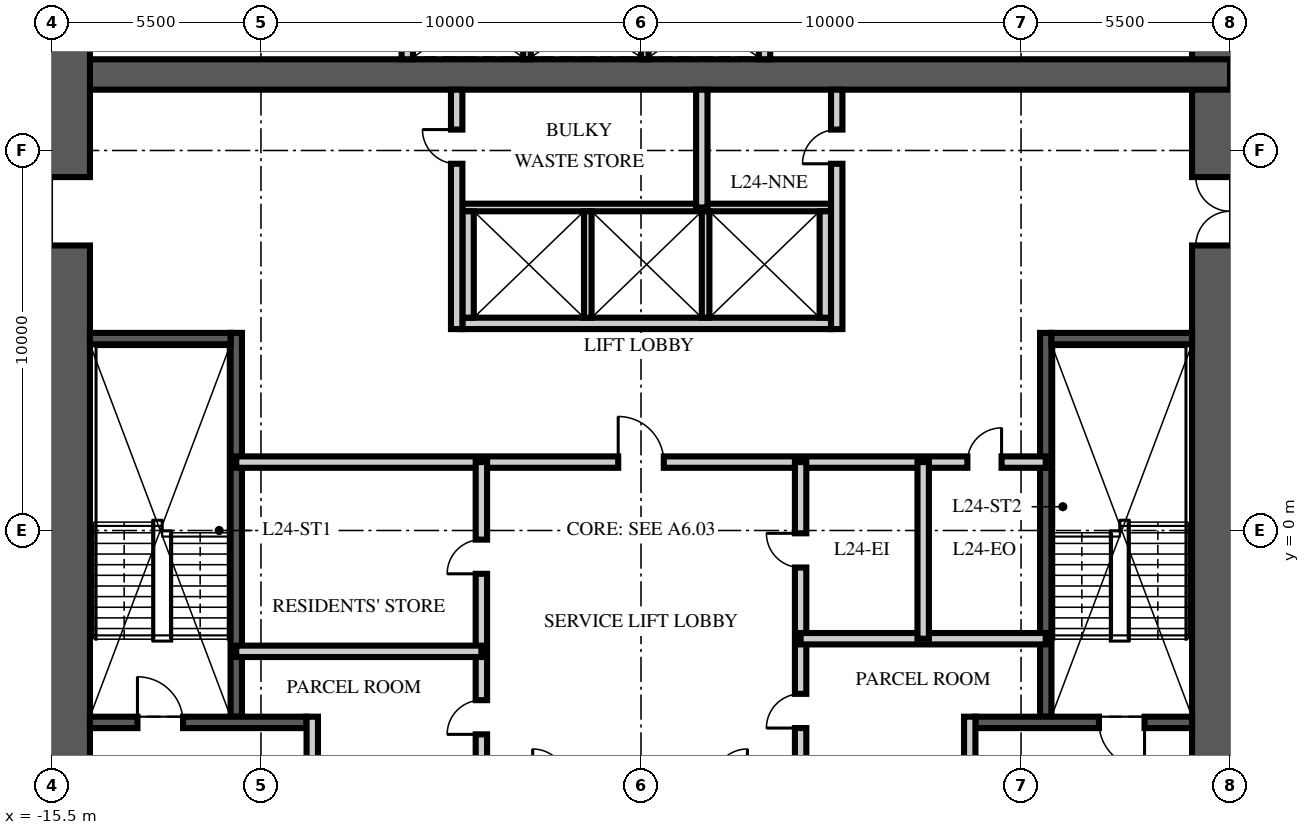
"""IFC4 building model, lengths in metres.
Left out: names, types, materials, properties, quantities, classifications, styles, units other than length and angle.
Written with IfcOpenShell. Run it as: python <this file> out.ifc"""

import sys

from ifc_helpers import new_model, si_unit, direction, frame, frame_2d, origin, place, context, subcontext, project, spatial, rectangle, extrude, element, fill, save


model = new_model("IFC4")
c1 = context("Model", 3, precision=1e-05, world=origin(), true_north=direction((0.0, 1.0)))
c2 = subcontext(c1, "Body", "Model", "MODEL_VIEW")
j1 = project(units=[si_unit("LENGTHUNIT", "METRE"), si_unit("PLANEANGLEUNIT", "RADIAN")], contexts=[c1])
p1 = place(None, origin())
s1 = spatial("IfcSite", under=j1, at=p1, CompositionType="ELEMENT")
p2 = place(p1, origin())
s2 = spatial("IfcBuilding", under=s1, at=p2, CompositionType="ELEMENT")
p3 = place(p2, frame((0.0, 0.0, 96.0)))
s3 = spatial("IfcBuildingStorey", under=s2, at=p3, CompositionType="ELEMENT", Elevation=96.0)
p4 = place(p3, frame((15.5, -15.5, -0.25), z_axis=(0.0, 0.0, 1.0), x_axis=(0.0, 1.0, 0.0)))
e1 = element("IfcWall", 1, at=p4, inside=s3, PredefinedType="SHEAR", context=c2, shape_type="SweptSolid", body=[
    extrude(rectangle(XDim=31.0, YDim=2.0, at=frame_2d((15.5, 0.0))), origin(), (0.0, 0.0, 1.0), 3.65),
])
p5 = place(p4, frame((6.5, 0.0, 0.25)))
e2 = element("IfcOpeningElement", 2, at=p5, cuts=e1, PredefinedType="OPENING", context=c2, shape_type="SweptSolid", body=[
    extrude(rectangle(XDim=1.2, YDim=2.1, at=frame_2d((0.6, 1.05))), frame((0.0, 1.01, 0.0), z_axis=(0.0, -1.0, 0.0), x_axis=(1.0, 0.0, 0.0)), (0.0, 0.0, 1.0), 2.02),
])
p6 = place(p4, frame((23.0, 0.0, 0.25)))
e3 = element("IfcOpeningElement", 3, at=p6, cuts=e1, PredefinedType="OPENING", context=c2, shape_type="SweptSolid", body=[
    extrude(rectangle(XDim=1.8, YDim=2.1, at=frame_2d((0.9, 1.05))), frame((0.0, 1.01, 0.0), z_axis=(0.0, -1.0, 0.0), x_axis=(1.0, 0.0, 0.0)), (0.0, 0.0, 1.0), 2.02),
])
p7 = place(p3, frame((-15.5, 12.0, -0.25), z_axis=(0.0, 0.0, 1.0), x_axis=(1.0, 0.0, 0.0)))
e4 = element("IfcWall", 4, at=p7, inside=s3, PredefinedType="SHEAR", context=c2, shape_type="SweptSolid", body=[
    extrude(rectangle(XDim=31.0, YDim=0.8, at=frame_2d((15.5, 0.0))), origin(), (0.0, 0.0, 1.0), 3.65),
])
p8 = place(p3, frame((-15.5, -15.5, -0.25), z_axis=(0.0, 0.0, 1.0), x_axis=(0.0, 1.0, 0.0)))
e5 = element("IfcWall", 5, at=p8, inside=s3, PredefinedType="SHEAR", context=c2, shape_type="SweptSolid", body=[
    extrude(rectangle(XDim=31.0, YDim=2.0, at=frame_2d((15.5, 0.0))), origin(), (0.0, 0.0, 1.0), 3.65),
])
p9 = place(p8, frame((6.5, 0.0, 0.25)))
e6 = element("IfcOpeningElement", 6, at=p9, cuts=e5, PredefinedType="OPENING", context=c2, shape_type="SweptSolid", body=[
    extrude(rectangle(XDim=1.2, YDim=2.1, at=frame_2d((0.6, 1.05))), frame((0.0, 1.01, 0.0), z_axis=(0.0, -1.0, 0.0), x_axis=(1.0, 0.0, 0.0)), (0.0, 0.0, 1.0), 2.02),
])
p10 = place(p8, frame((23.0, 0.0, 0.25)))
e7 = element("IfcOpeningElement", 7, at=p10, cuts=e5, PredefinedType="OPENING", context=c2, shape_type="SweptSolid", body=[
    extrude(rectangle(XDim=1.8, YDim=2.1, at=frame_2d((0.9, 1.05))), frame((0.0, 1.01, 0.0), z_axis=(0.0, -1.0, 0.0), x_axis=(1.0, 0.0, 0.0)), (0.0, 0.0, 1.0), 2.02),
])
p11 = place(p3, frame((-10.65, -4.9, 0.0), z_axis=(0.0, 0.0, 1.0), x_axis=(0.0, 1.0, 0.0)))
e8 = element("IfcWall", 8, at=p11, inside=s3, PredefinedType="SOLIDWALL", context=c2, shape_type="SweptSolid", body=[
    extrude(rectangle(XDim=10.1, YDim=0.3, at=frame_2d((5.05, 0.0))), origin(), (0.0, 0.0, 1.0), 3.4),
])
p12 = place(p3, frame((-14.5, -5.05, 0.0), z_axis=(0.0, 0.0, 1.0), x_axis=(1.0, 0.0, 0.0)))
e9 = element("IfcWall", 9, at=p12, inside=s3, PredefinedType="SOLIDWALL", context=c2, shape_type="SweptSolid", body=[
    extrude(rectangle(XDim=5.7, YDim=0.3, at=frame_2d((2.85, 0.0))), origin(), (0.0, 0.0, 1.0), 3.4),
])
p13 = place(p12, frame((1.25, 0.0, 0.0)))
e10 = element("IfcOpeningElement", 10, at=p13, cuts=e9, PredefinedType="OPENING", context=c2, shape_type="SweptSolid", body=[
    extrude(rectangle(XDim=1.2, YDim=2.1, at=frame_2d((0.6, 1.05))), frame((0.0, 0.16, 0.0), z_axis=(0.0, -1.0, 0.0), x_axis=(1.0, 0.0, 0.0)), (0.0, 0.0, 1.0), 0.32),
])
p14 = place(p3, frame((-14.5, 5.05, 0.0), z_axis=(0.0, 0.0, 1.0), x_axis=(1.0, 0.0, 0.0)))
e11 = element("IfcWall", 11, at=p14, inside=s3, PredefinedType="SOLIDWALL", context=c2, shape_type="SweptSolid", body=[
    extrude(rectangle(XDim=3.7, YDim=0.3, at=frame_2d((1.85, 0.0))), origin(), (0.0, 0.0, 1.0), 3.4),
])
p15 = place(p3, frame((-8.65, -11.6, 0.0), z_axis=(0.0, 0.0, 1.0), x_axis=(0.0, 1.0, 0.0)))
e12 = element("IfcWall", 12, at=p15, inside=s3, PredefinedType="PARTITIONING", context=c2, shape_type="SweptSolid", body=[
    extrude(rectangle(XDim=6.7, YDim=0.3, at=frame_2d((3.35, 0.0))), origin(), (0.0, 0.0, 1.0), 3.4),
])
p16 = place(p15, frame((2.85, 0.0, 0.0)))
e13 = element("IfcOpeningElement", 13, at=p16, cuts=e12, PredefinedType="OPENING", context=c2, shape_type="SweptSolid", body=[
    extrude(rectangle(XDim=1.1, YDim=2.1, at=frame_2d((0.55, 1.05))), frame((0.0, 0.16, 0.0), z_axis=(0.0, -1.0, 0.0), x_axis=(1.0, 0.0, 0.0)), (0.0, 0.0, 1.0), 0.32),
])
p17 = place(p3, frame((10.65, -4.9, 0.0), z_axis=(0.0, 0.0, 1.0), x_axis=(0.0, 1.0, 0.0)))
e14 = element("IfcWall", 14, at=p17, inside=s3, PredefinedType="SOLIDWALL", context=c2, shape_type="SweptSolid", body=[
    extrude(rectangle(XDim=10.1, YDim=0.3, at=frame_2d((5.05, 0.0))), origin(), (0.0, 0.0, 1.0), 3.4),
])
p18 = place(p3, frame((14.5, -5.05, 0.0), z_axis=(0.0, 0.0, 1.0), x_axis=(-1.0, 0.0, 0.0)))
e15 = element("IfcWall", 15, at=p18, inside=s3, PredefinedType="SOLIDWALL", context=c2, shape_type="SweptSolid", body=[
    extrude(rectangle(XDim=5.7, YDim=0.3, at=frame_2d((2.85, 0.0))), origin(), (0.0, 0.0, 1.0), 3.4),
])
p19 = place(p18, frame((1.25, 0.0, 0.0)))
e16 = element("IfcOpeningElement", 16, at=p19, cuts=e15, PredefinedType="OPENING", context=c2, shape_type="SweptSolid", body=[
    extrude(rectangle(XDim=1.2, YDim=2.1, at=frame_2d((0.6, 1.05))), frame((0.0, 0.16, 0.0), z_axis=(0.0, -1.0, 0.0), x_axis=(1.0, 0.0, 0.0)), (0.0, 0.0, 1.0), 0.32),
])
p20 = place(p3, frame((14.5, 5.05, 0.0), z_axis=(0.0, 0.0, 1.0), x_axis=(-1.0, 0.0, 0.0)))
e17 = element("IfcWall", 17, at=p20, inside=s3, PredefinedType="SOLIDWALL", context=c2, shape_type="SweptSolid", body=[
    extrude(rectangle(XDim=3.7, YDim=0.3, at=frame_2d((1.85, 0.0))), origin(), (0.0, 0.0, 1.0), 3.4),
])
p21 = place(p3, frame((8.65, -11.6, 0.0), z_axis=(0.0, 0.0, 1.0), x_axis=(0.0, 1.0, 0.0)))
e18 = element("IfcWall", 18, at=p21, inside=s3, PredefinedType="PARTITIONING", context=c2, shape_type="SweptSolid", body=[
    extrude(rectangle(XDim=6.7, YDim=0.3, at=frame_2d((3.35, 0.0))), origin(), (0.0, 0.0, 1.0), 3.4),
])
p22 = place(p21, frame((2.85, 0.0, 0.0)))
e19 = element("IfcOpeningElement", 19, at=p22, cuts=e18, PredefinedType="OPENING", context=c2, shape_type="SweptSolid", body=[
    extrude(rectangle(XDim=1.1, YDim=2.1, at=frame_2d((0.55, 1.05))), frame((0.0, 0.16, 0.0), z_axis=(0.0, -1.0, 0.0), x_axis=(1.0, 0.0, 0.0)), (0.0, 0.0, 1.0), 0.32),
])
p23 = place(p3, frame((-4.7, 5.45, 0.0), z_axis=(0.0, 0.0, 1.0), x_axis=(1.0, 0.0, 0.0)))
e20 = element("IfcWall", 20, at=p23, inside=s3, PredefinedType="PARTITIONING", context=c2, shape_type="SweptSolid", body=[
    extrude(rectangle(XDim=9.7, YDim=0.3, at=frame_2d((4.85, 0.0))), origin(), (0.0, 0.0, 1.0), 3.4),
])
p24 = place(p3, frame((-4.7, 8.5, 0.0), z_axis=(0.0, 0.0, 1.0), x_axis=(1.0, 0.0, 0.0)))
e21 = element("IfcWall", 21, at=p24, inside=s3, PredefinedType="PARTITIONING", context=c2, shape_type="SweptSolid", body=[
    extrude(rectangle(XDim=9.7, YDim=0.2, at=frame_2d((4.85, 0.0))), origin(), (0.0, 0.0, 1.0), 3.4),
])
for number, where, z_axis, x_axis in (
    (22, (-4.55, 5.6, 0.0), (0.0, 0.0, 1.0), (0.0, 1.0, 0.0)),
    (23, (4.85, 5.6, 0.0), (0.0, 0.0, 1.0), (0.0, 1.0, 0.0)),
):
    element("IfcWall", number, at=place(p3, frame(where, z_axis=z_axis, x_axis=x_axis)), inside=s3, PredefinedType="PARTITIONING", context=c2, shape_type="SweptSolid", body=[
        extrude(rectangle(XDim=2.8, YDim=0.3, at=frame_2d((1.4, 0.0))), origin(), (0.0, 0.0, 1.0), 3.4),
    ])
for number, where, z_axis, x_axis in (
    (24, (-1.4, 5.6, 0.0), (0.0, 0.0, 1.0), (0.0, 1.0, 0.0)),
    (25, (1.7, 5.6, 0.0), (0.0, 0.0, 1.0), (0.0, 1.0, 0.0)),
):
    element("IfcWall", number, at=place(p3, frame(where, z_axis=z_axis, x_axis=x_axis)), inside=s3, PredefinedType="PARTITIONING", context=c2, shape_type="SweptSolid", body=[
        extrude(rectangle(XDim=2.8, YDim=0.2, at=frame_2d((1.4, 0.0))), origin(), (0.0, 0.0, 1.0), 3.4),
    ])
for number, where, z_axis, x_axis in (
    (26, (-6.15, 12.4, 0.0), (0.0, 0.0, 1.0), (0.0, 1.0, 0.0)),
    (27, (3.25, 12.4, 0.0), (0.0, 0.0, 1.0), (0.0, 1.0, 0.0)),
):
    element("IfcWall", number, at=place(p3, frame(where, z_axis=z_axis, x_axis=x_axis)), inside=s3, PredefinedType="PARTITIONING", context=c2, shape_type="SweptSolid", body=[
        extrude(rectangle(XDim=2.1, YDim=0.3, at=frame_2d((1.05, 0.0))), origin(), (0.0, 0.0, 1.0), 3.4),
    ])
for number, where, z_axis, x_axis in (
    (28, (-3.0, 12.4, 0.0), (0.0, 0.0, 1.0), (0.0, 1.0, 0.0)),
    (29, (0.1, 12.4, 0.0), (0.0, 0.0, 1.0), (0.0, 1.0, 0.0)),
):
    element("IfcWall", number, at=place(p3, frame(where, z_axis=z_axis, x_axis=x_axis)), inside=s3, PredefinedType="PARTITIONING", context=c2, shape_type="SweptSolid", body=[
        extrude(rectangle(XDim=2.1, YDim=0.2, at=frame_2d((1.05, 0.0))), origin(), (0.0, 0.0, 1.0), 3.4),
    ])
p25 = place(p3, frame((-10.65, 1.8, 0.0), z_axis=(0.0, 0.0, 1.0), x_axis=(1.0, 0.0, 0.0)))
e30 = element("IfcWall", 30, at=p25, inside=s3, PredefinedType="PARTITIONING", context=c2, shape_type="SweptSolid", body=[
    extrude(rectangle(XDim=21.3, YDim=0.3, at=frame_2d((10.65, 0.0))), origin(), (0.0, 0.0, 1.0), 3.4),
])
p26 = place(p25, frame((10.05, 0.0, 0.0)))
e31 = element("IfcOpeningElement", 31, at=p26, cuts=e30, PredefinedType="OPENING", context=c2, shape_type="SweptSolid", body=[
    extrude(rectangle(XDim=1.2, YDim=2.1, at=frame_2d((0.6, 1.05))), frame((0.0, 0.16, 0.0), z_axis=(0.0, -1.0, 0.0), x_axis=(1.0, 0.0, 0.0)), (0.0, 0.0, 1.0), 0.32),
])
p27 = place(p25, frame((19.238, 0.0, 0.0)))
e32 = element("IfcOpeningElement", 32, at=p27, cuts=e30, PredefinedType="OPENING", context=c2, shape_type="SweptSolid", body=[
    extrude(rectangle(XDim=0.9, YDim=2.1, at=frame_2d((0.45, 1.05))), frame((0.0, 0.16, 0.0), z_axis=(0.0, -1.0, 0.0), x_axis=(1.0, 0.0, 0.0)), (0.0, 0.0, 1.0), 0.32),
])
p28 = place(p3, frame((-4.2, -6.65, 0.0), z_axis=(0.0, 0.0, 1.0), x_axis=(0.0, 1.0, 0.0)))
e33 = element("IfcWall", 33, at=p28, inside=s3, PredefinedType="PARTITIONING", context=c2, shape_type="SweptSolid", body=[
    extrude(rectangle(XDim=8.45, YDim=0.3, at=frame_2d((4.225, 0.0))), origin(), (0.0, 0.0, 1.0), 3.4),
])
p29 = place(p28, frame((1.285, 0.0, 0.0)))
e34 = element("IfcOpeningElement", 34, at=p29, cuts=e33, PredefinedType="OPENING", context=c2, shape_type="SweptSolid", body=[
    extrude(rectangle(XDim=0.9, YDim=2.1, at=frame_2d((0.45, 1.05))), frame((0.0, 0.16, 0.0), z_axis=(0.0, -1.0, 0.0), x_axis=(1.0, 0.0, 0.0)), (0.0, 0.0, 1.0), 0.32),
])
p30 = place(p28, frame((5.51, 0.0, 0.0)))
e35 = element("IfcOpeningElement", 35, at=p30, cuts=e33, PredefinedType="OPENING", context=c2, shape_type="SweptSolid", body=[
    extrude(rectangle(XDim=0.9, YDim=2.1, at=frame_2d((0.45, 1.05))), frame((0.0, 0.16, 0.0), z_axis=(0.0, -1.0, 0.0), x_axis=(1.0, 0.0, 0.0)), (0.0, 0.0, 1.0), 0.32),
])
p31 = place(p3, frame((4.2, -6.65, 0.0), z_axis=(0.0, 0.0, 1.0), x_axis=(0.0, 1.0, 0.0)))
e36 = element("IfcWall", 36, at=p31, inside=s3, PredefinedType="PARTITIONING", context=c2, shape_type="SweptSolid", body=[
    extrude(rectangle(XDim=8.45, YDim=0.3, at=frame_2d((4.225, 0.0))), origin(), (0.0, 0.0, 1.0), 3.4),
])
p32 = place(p31, frame((1.451, 0.0, 0.0)))
e37 = element("IfcOpeningElement", 37, at=p32, cuts=e36, PredefinedType="OPENING", context=c2, shape_type="SweptSolid", body=[
    extrude(rectangle(XDim=0.9, YDim=2.1, at=frame_2d((0.45, 1.05))), frame((0.0, 0.16, 0.0), z_axis=(0.0, -1.0, 0.0), x_axis=(1.0, 0.0, 0.0)), (0.0, 0.0, 1.0), 0.32),
])
p33 = place(p31, frame((5.676, 0.0, 0.0)))
e38 = element("IfcOpeningElement", 38, at=p33, cuts=e36, PredefinedType="OPENING", context=c2, shape_type="SweptSolid", body=[
    extrude(rectangle(XDim=0.9, YDim=2.1, at=frame_2d((0.45, 1.05))), frame((0.0, 0.16, 0.0), z_axis=(0.0, -1.0, 0.0), x_axis=(1.0, 0.0, 0.0)), (0.0, 0.0, 1.0), 0.32),
])
for number, where, z_axis, x_axis in (
    (39, (-10.65, -3.18, 0.0), (0.0, 0.0, 1.0), (1.0, 0.0, 0.0)),
    (40, (10.65, -2.848, 0.0), (0.0, 0.0, 1.0), (-1.0, 0.0, 0.0)),
):
    element("IfcWall", number, at=place(p3, frame(where, z_axis=z_axis, x_axis=x_axis)), inside=s3, PredefinedType="PARTITIONING", context=c2, shape_type="SweptSolid", body=[
        extrude(rectangle(XDim=6.45, YDim=0.3, at=frame_2d((3.225, 0.0))), origin(), (0.0, 0.0, 1.0), 3.4),
    ])
p34 = place(p3, frame((7.425, -2.848, 0.0), z_axis=(0.0, 0.0, 1.0), x_axis=(0.0, 1.0, 0.0)))
e41 = element("IfcWall", 41, at=p34, inside=s3, PredefinedType="PARTITIONING", context=c2, shape_type="SweptSolid", body=[
    extrude(rectangle(XDim=4.648, YDim=0.3, at=frame_2d((2.324, 0.0))), origin(), (0.0, 0.0, 1.0), 3.4),
])
p35 = place(p3, frame((-4.85, 5.3, 0.0), z_axis=(0.0, 0.0, 1.0), x_axis=(0.0, 1.0, 0.0)))
e42 = element("IfcWall", 42, at=p35, inside=s3, PredefinedType="PARTITIONING", context=c2, shape_type="SweptSolid", body=[
    extrude(rectangle(XDim=6.3, YDim=0.3, at=frame_2d((3.15, 0.0))), origin(), (0.0, 0.0, 1.0), 3.4),
])
p36 = place(p35, frame((4.35, 0.0, 0.0)))
e43 = element("IfcOpeningElement", 43, at=p36, cuts=e42, PredefinedType="OPENING", context=c2, shape_type="SweptSolid", body=[
    extrude(rectangle(XDim=0.9, YDim=2.1, at=frame_2d((0.45, 1.05))), frame((0.0, 0.16, 0.0), z_axis=(0.0, -1.0, 0.0), x_axis=(1.0, 0.0, 0.0)), (0.0, 0.0, 1.0), 0.32),
])
p37 = place(p3, frame((5.15, 5.3, 0.0), z_axis=(0.0, 0.0, 1.0), x_axis=(0.0, 1.0, 0.0)))
e44 = element("IfcWall", 44, at=p37, inside=s3, PredefinedType="PARTITIONING", context=c2, shape_type="SweptSolid", body=[
    extrude(rectangle(XDim=6.3, YDim=0.3, at=frame_2d((3.15, 0.0))), origin(), (0.0, 0.0, 1.0), 3.4),
])
p38 = place(p37, frame((4.35, 0.0, 0.0)))
e45 = element("IfcOpeningElement", 45, at=p38, cuts=e44, PredefinedType="OPENING", context=c2, shape_type="SweptSolid", body=[
    extrude(rectangle(XDim=0.9, YDim=2.1, at=frame_2d((0.45, 1.05))), frame((0.0, 0.16, 0.0), z_axis=(0.0, -1.0, 0.0), x_axis=(1.0, 0.0, 0.0)), (0.0, 0.0, 1.0), 0.32),
])
p39 = place(p3, frame((1.6, 8.5, 0.0), z_axis=(0.0, 0.0, 1.0), x_axis=(0.0, 1.0, 0.0)))
e46 = element("IfcWall", 46, at=p39, inside=s3, PredefinedType="PARTITIONING", context=c2, shape_type="SweptSolid", body=[
    extrude(rectangle(XDim=3.1, YDim=0.3, at=frame_2d((1.55, 0.0))), origin(), (0.0, 0.0, 1.0), 3.4),
])
p40 = place(p13, origin())
e47 = element("IfcDoor", 47, at=p40, inside=s3, OperationType="SINGLE_SWING_LEFT", PredefinedType="DOOR", context=c2, shape_type="SweptSolid", body=[
    extrude(rectangle(XDim=1.2, YDim=2.1, at=frame_2d((0.6, 1.05))), frame((0.0, 0.025, 0.0), z_axis=(0.0, -1.0, 0.0), x_axis=(1.0, 0.0, 0.0)), (0.0, 0.0, 1.0), 0.05),
])
fill(e10, e47)
p41 = place(p10, origin())
e48 = element("IfcDoor", 48, at=p41, inside=s3, OperationType="DOUBLE_DOOR_SINGLE_SWING", PredefinedType="DOOR", context=c2, shape_type="SweptSolid", body=[
    extrude(rectangle(XDim=1.8, YDim=2.1, at=frame_2d((0.9, 1.05))), frame((0.0, 0.025, 0.0), z_axis=(0.0, -1.0, 0.0), x_axis=(1.0, 0.0, 0.0)), (0.0, 0.0, 1.0), 0.05),
])
fill(e7, e48)
p42 = place(p19, origin())
e49 = element("IfcDoor", 49, at=p42, inside=s3, OperationType="SINGLE_SWING_LEFT", PredefinedType="DOOR", context=c2, shape_type="SweptSolid", body=[
    extrude(rectangle(XDim=1.2, YDim=2.1, at=frame_2d((0.6, 1.05))), frame((0.0, 0.025, 0.0), z_axis=(0.0, -1.0, 0.0), x_axis=(1.0, 0.0, 0.0)), (0.0, 0.0, 1.0), 0.05),
])
fill(e16, e49)
p43 = place(p6, origin())
e50 = element("IfcDoor", 50, at=p43, inside=s3, OperationType="DOUBLE_DOOR_SINGLE_SWING", PredefinedType="DOOR", context=c2, shape_type="SweptSolid", body=[
    extrude(rectangle(XDim=1.8, YDim=2.1, at=frame_2d((0.9, 1.05))), frame((0.0, 0.025, 0.0), z_axis=(0.0, -1.0, 0.0), x_axis=(1.0, 0.0, 0.0)), (0.0, 0.0, 1.0), 0.05),
])
fill(e3, e50)
p44 = place(p26, origin())
e51 = element("IfcDoor", 51, at=p44, inside=s3, OperationType="SINGLE_SWING_LEFT", PredefinedType="DOOR", context=c2, shape_type="SweptSolid", body=[
    extrude(rectangle(XDim=1.2, YDim=2.1, at=frame_2d((0.6, 1.05))), frame((0.0, 0.025, 0.0), z_axis=(0.0, -1.0, 0.0), x_axis=(1.0, 0.0, 0.0)), (0.0, 0.0, 1.0), 0.05),
])
fill(e31, e51)
p45 = place(p29, origin())
e52 = element("IfcDoor", 52, at=p45, inside=s3, OperationType="SINGLE_SWING_LEFT", PredefinedType="DOOR", context=c2, shape_type="SweptSolid", body=[
    extrude(rectangle(XDim=0.9, YDim=2.1, at=frame_2d((0.45, 1.05))), frame((0.0, 0.025, 0.0), z_axis=(0.0, -1.0, 0.0), x_axis=(1.0, 0.0, 0.0)), (0.0, 0.0, 1.0), 0.05),
])
fill(e34, e52)
p46 = place(p30, origin())
e53 = element("IfcDoor", 53, at=p46, inside=s3, OperationType="SINGLE_SWING_LEFT", PredefinedType="DOOR", context=c2, shape_type="SweptSolid", body=[
    extrude(rectangle(XDim=0.9, YDim=2.1, at=frame_2d((0.45, 1.05))), frame((0.0, 0.025, 0.0), z_axis=(0.0, -1.0, 0.0), x_axis=(1.0, 0.0, 0.0)), (0.0, 0.0, 1.0), 0.05),
])
fill(e35, e53)
p47 = place(p32, origin())
e54 = element("IfcDoor", 54, at=p47, inside=s3, OperationType="SINGLE_SWING_LEFT", PredefinedType="DOOR", context=c2, shape_type="SweptSolid", body=[
    extrude(rectangle(XDim=0.9, YDim=2.1, at=frame_2d((0.45, 1.05))), frame((0.0, 0.025, 0.0), z_axis=(0.0, -1.0, 0.0), x_axis=(1.0, 0.0, 0.0)), (0.0, 0.0, 1.0), 0.05),
])
fill(e37, e54)
p48 = place(p33, origin())
e55 = element("IfcDoor", 55, at=p48, inside=s3, OperationType="SINGLE_SWING_RIGHT", PredefinedType="DOOR", context=c2, shape_type="SweptSolid", body=[
    extrude(rectangle(XDim=0.9, YDim=2.1, at=frame_2d((0.45, 1.05))), frame((0.0, 0.025, 0.0), z_axis=(0.0, -1.0, 0.0), x_axis=(1.0, 0.0, 0.0)), (0.0, 0.0, 1.0), 0.05),
])
fill(e38, e55)
p49 = place(p27, origin())
e56 = element("IfcDoor", 56, at=p49, inside=s3, OperationType="SINGLE_SWING_RIGHT", PredefinedType="DOOR", context=c2, shape_type="SweptSolid", body=[
    extrude(rectangle(XDim=0.9, YDim=2.1, at=frame_2d((0.45, 1.05))), frame((0.0, 0.025, 0.0), z_axis=(0.0, -1.0, 0.0), x_axis=(1.0, 0.0, 0.0)), (0.0, 0.0, 1.0), 0.05),
])
fill(e32, e56)
p50 = place(p36, origin())
e57 = element("IfcDoor", 57, at=p50, inside=s3, OperationType="SINGLE_SWING_RIGHT", PredefinedType="DOOR", context=c2, shape_type="SweptSolid", body=[
    extrude(rectangle(XDim=0.9, YDim=2.1, at=frame_2d((0.45, 1.05))), frame((0.0, 0.025, 0.0), z_axis=(0.0, -1.0, 0.0), x_axis=(1.0, 0.0, 0.0)), (0.0, 0.0, 1.0), 0.05),
])
fill(e43, e57)
p51 = place(p38, origin())
e58 = element("IfcDoor", 58, at=p51, inside=s3, OperationType="SINGLE_SWING_LEFT", PredefinedType="DOOR", context=c2, shape_type="SweptSolid", body=[
    extrude(rectangle(XDim=0.9, YDim=2.1, at=frame_2d((0.45, 1.05))), frame((0.0, 0.025, 0.0), z_axis=(0.0, -1.0, 0.0), x_axis=(1.0, 0.0, 0.0)), (0.0, 0.0, 1.0), 0.05),
])
fill(e45, e58)
save(model, sys.argv[1])
